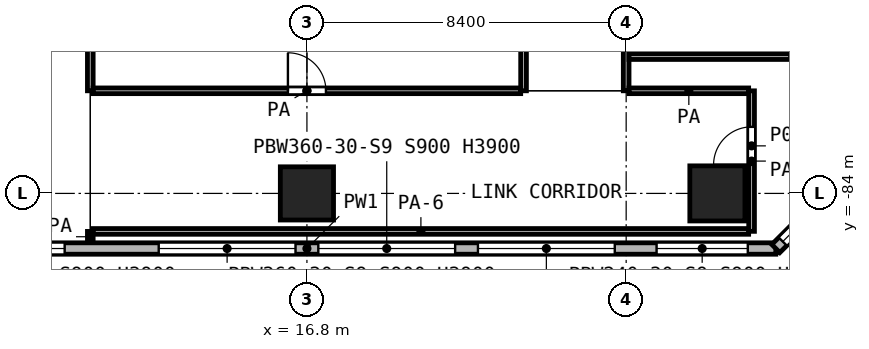
"""IFC4 building model, lengths in metres.
Left out: names, types, materials, properties, quantities, classifications, styles, units other than length and angle.
Written with IfcOpenShell. Run it as: python <this file> out.ifc"""

import sys

from ifc_helpers import new_model, si_unit, direction, frame, frame_2d, origin, origin_2d, place, context, subcontext, project, spatial, rectangle, extrude, element, fill, save


model = new_model("IFC4")
c1 = context("Model", 3, precision=1e-05, world=origin(), true_north=direction((0.0, 1.0)))
c2 = subcontext(c1, "Body", "Model", "MODEL_VIEW")
j1 = project(units=[si_unit("LENGTHUNIT", "METRE"), si_unit("PLANEANGLEUNIT", "RADIAN")], contexts=[c1])
p1 = place(None, origin())
s1 = spatial("IfcSite", under=j1, at=p1, CompositionType="ELEMENT")
p2 = place(p1, origin())
s2 = spatial("IfcBuilding", under=s1, at=p2, CompositionType="ELEMENT")
p3 = place(p2, frame((0.0, 0.0, 12.6)))
s3 = spatial("IfcBuildingStorey", under=s2, at=p3, CompositionType="ELEMENT", Elevation=12.6)
p4 = place(p3, frame((16.8, -84.0, 0.0), z_axis=(0.0, 0.0, 1.0), x_axis=(1.0, 0.0, 0.0)))
e1 = element("IfcColumn", 1, at=p4, inside=s3, PredefinedType="COLUMN", context=c2, shape_type="SweptSolid", body=[
    extrude(rectangle(XDim=1.4, YDim=1.4, at=origin_2d()), origin(), (0.0, 0.0, 1.0), 5.6),
])
p5 = place(p3, frame((27.6, -84.0, 0.0), z_axis=(0.0, 0.0, 1.0), x_axis=(1.0, 0.0, 0.0)))
e2 = element("IfcColumn", 2, at=p5, inside=s3, PredefinedType="COLUMN", context=c2, shape_type="SweptSolid", body=[
    extrude(rectangle(XDim=1.45, YDim=1.45, at=origin_2d()), origin(), (0.0, 0.0, 1.0), 5.6),
])
p6 = place(p3, frame((4.462, -85.45, 0.0), z_axis=(0.0, 0.0, 1.0), x_axis=(1.0, 0.0, 0.0)))
e3 = element("IfcWall", 3, at=p6, inside=s3, PredefinedType="SOLIDWALL", context=c2, shape_type="SweptSolid", body=[
    extrude(rectangle(XDim=24.676, YDim=0.3, at=frame_2d((12.338, 0.0))), origin(), (0.0, 0.0, 1.0), 5.25),
])
p7 = place(p6, frame((0.738, 0.0, 0.9)))
e4 = element("IfcOpeningElement", 4, at=p7, cuts=e3, PredefinedType="OPENING", context=c2, shape_type="SweptSolid", body=[
    extrude(rectangle(XDim=2.4, YDim=3.0, at=frame_2d((1.2, 1.5))), frame((0.0, 0.16, 0.0), z_axis=(0.0, -1.0, 0.0), x_axis=(1.0, 0.0, 0.0)), (0.0, 0.0, 1.0), 0.32),
])
p8 = place(p6, frame((4.763, 0.0, 0.9)))
e5 = element("IfcOpeningElement", 5, at=p8, cuts=e3, PredefinedType="OPENING", context=c2, shape_type="SweptSolid", body=[
    extrude(rectangle(XDim=1.2, YDim=3.0, at=frame_2d((0.6, 1.5))), frame((0.0, 0.16, 0.0), z_axis=(0.0, -1.0, 0.0), x_axis=(1.0, 0.0, 0.0)), (0.0, 0.0, 1.0), 0.32),
])
p9 = place(p6, frame((8.438, 0.0, 0.9)))
e6 = element("IfcOpeningElement", 6, at=p9, cuts=e3, PredefinedType="OPENING", context=c2, shape_type="SweptSolid", body=[
    extrude(rectangle(XDim=3.6, YDim=3.0, at=frame_2d((1.8, 1.5))), frame((0.0, 0.16, 0.0), z_axis=(0.0, -1.0, 0.0), x_axis=(1.0, 0.0, 0.0)), (0.0, 0.0, 1.0), 0.32),
])
p10 = place(p6, frame((12.638, 0.0, 0.9)))
e7 = element("IfcOpeningElement", 7, at=p10, cuts=e3, PredefinedType="OPENING", context=c2, shape_type="SweptSolid", body=[
    extrude(rectangle(XDim=3.6, YDim=3.0, at=frame_2d((1.8, 1.5))), frame((0.0, 0.16, 0.0), z_axis=(0.0, -1.0, 0.0), x_axis=(1.0, 0.0, 0.0)), (0.0, 0.0, 1.0), 0.32),
])
p11 = place(p6, frame((16.838, 0.0, 0.9)))
e8 = element("IfcOpeningElement", 8, at=p11, cuts=e3, PredefinedType="OPENING", context=c2, shape_type="SweptSolid", body=[
    extrude(rectangle(XDim=3.6, YDim=3.0, at=frame_2d((1.8, 1.5))), frame((0.0, 0.16, 0.0), z_axis=(0.0, -1.0, 0.0), x_axis=(1.0, 0.0, 0.0)), (0.0, 0.0, 1.0), 0.32),
])
p12 = place(p6, frame((21.538, 0.0, 0.9)))
e9 = element("IfcOpeningElement", 9, at=p12, cuts=e3, PredefinedType="OPENING", context=c2, shape_type="SweptSolid", body=[
    extrude(rectangle(XDim=2.4, YDim=3.0, at=frame_2d((1.2, 1.5))), frame((0.0, 0.16, 0.0), z_axis=(0.0, -1.0, 0.0), x_axis=(1.0, 0.0, 0.0)), (0.0, 0.0, 1.0), 0.32),
])
p13 = place(p3, frame((29.138, -85.45, 0.0), z_axis=(0.0, 0.0, 1.0), x_axis=(0.707106781187, 0.707106781187, 0.0)))
e10 = element("IfcWall", 10, at=p13, inside=s3, PredefinedType="SOLIDWALL", context=c2, shape_type="SweptSolid", body=[
    extrude(rectangle(XDim=8.361, YDim=0.3, at=frame_2d((4.181, 0.0))), origin(), (0.0, 0.0, 1.0), 5.25),
])
p14 = place(p13, frame((0.259, 0.0, 0.9)))
e11 = element("IfcOpeningElement", 11, at=p14, cuts=e10, PredefinedType="OPENING", context=c2, shape_type="SweptSolid", body=[
    extrude(rectangle(XDim=3.6, YDim=3.0, at=frame_2d((1.8, 1.5))), frame((0.0, 0.16, 0.0), z_axis=(0.0, -1.0, 0.0), x_axis=(1.0, 0.0, 0.0)), (0.0, 0.0, 1.0), 0.32),
])
p15 = place(p13, frame((4.911, 0.0, 0.9)))
e12 = element("IfcOpeningElement", 12, at=p15, cuts=e10, PredefinedType="OPENING", context=c2, shape_type="SweptSolid", body=[
    extrude(rectangle(XDim=1.2, YDim=3.0, at=frame_2d((0.6, 1.5))), frame((0.0, 0.16, 0.0), z_axis=(0.0, -1.0, 0.0), x_axis=(1.0, 0.0, 0.0)), (0.0, 0.0, 1.0), 0.32),
])
p16 = place(p3, frame((11.175, -85.0, 0.0), z_axis=(0.0, 0.0, 1.0), x_axis=(1.0, 0.0, 0.0)))
e13 = element("IfcWall", 13, at=p16, inside=s3, PredefinedType="PARTITIONING", context=c2, shape_type="SweptSolid", body=[
    extrude(rectangle(XDim=17.248, YDim=0.15, at=frame_2d((8.624, 0.0))), origin(), (0.0, 0.0, 1.0), 4.35),
])
p17 = place(p3, frame((11.175, -81.3, 0.0), z_axis=(0.0, 0.0, 1.0), x_axis=(1.0, 0.0, 0.0)))
e14 = element("IfcWall", 14, at=p17, inside=s3, PredefinedType="PARTITIONING", context=c2, shape_type="SweptSolid", body=[
    extrude(rectangle(XDim=11.25, YDim=0.15, at=frame_2d((5.625, 0.0))), origin(), (0.0, 0.0, 1.0), 5.25),
])
p18 = place(p17, frame((5.125, 0.0, 0.0)))
e15 = element("IfcOpeningElement", 15, at=p18, cuts=e14, PredefinedType="OPENING", context=c2, shape_type="SweptSolid", body=[
    extrude(rectangle(XDim=1.0, YDim=2.1, at=frame_2d((0.5, 1.05))), frame((0.0, 0.085, 0.0), z_axis=(0.0, -1.0, 0.0), x_axis=(1.0, 0.0, 0.0)), (0.0, 0.0, 1.0), 0.17),
])
p19 = place(p3, frame((25.275, -81.3, 0.0), z_axis=(0.0, 0.0, 1.0), x_axis=(1.0, 0.0, 0.0)))
e16 = element("IfcWall", 16, at=p19, inside=s3, PredefinedType="PARTITIONING", context=c2, shape_type="SweptSolid", body=[
    extrude(rectangle(XDim=3.148, YDim=0.15, at=frame_2d((1.574, 0.0))), origin(), (0.0, 0.0, 1.0), 5.25),
])
p20 = place(p3, frame((25.275, -80.4, 0.0), z_axis=(0.0, 0.0, 1.0), x_axis=(1.0, 0.0, 0.0)))
e17 = element("IfcWall", 17, at=p20, inside=s3, PredefinedType="PARTITIONING", context=c2, shape_type="SweptSolid", body=[
    extrude(rectangle(XDim=8.612, YDim=0.15, at=frame_2d((4.306, 0.0))), origin(), (0.0, 0.0, 1.0), 3.85),
])
p21 = place(p3, frame((11.1, -85.28, 0.0), z_axis=(0.0, 0.0, 1.0), x_axis=(0.0, 1.0, 0.0)))
e18 = element("IfcWall", 18, at=p21, inside=s3, PredefinedType="PARTITIONING", context=c2, shape_type="SweptSolid", body=[
    extrude(rectangle(XDim=0.28, YDim=0.15, at=frame_2d((0.14, 0.0))), origin(), (0.0, 0.0, 1.0), 5.25),
])
p22 = place(p3, frame((11.1, -81.3, 0.0), z_axis=(0.0, 0.0, 1.0), x_axis=(0.0, 1.0, 0.0)))
e19 = element("IfcWall", 19, at=p22, inside=s3, PredefinedType="PARTITIONING", context=c2, shape_type="SweptSolid", body=[
    extrude(rectangle(XDim=51.9, YDim=0.15, at=frame_2d((25.95, 0.0))), origin(), (0.0, 0.0, 1.0), 5.25),
])
p23 = place(p22, frame((36.45, 0.0, 0.0)))
e20 = element("IfcOpeningElement", 20, at=p23, cuts=e19, PredefinedType="OPENING", context=c2, shape_type="SweptSolid", body=[
    extrude(rectangle(XDim=1.5, YDim=2.1, at=frame_2d((0.75, 1.05))), frame((0.0, 0.085, 0.0), z_axis=(0.0, -1.0, 0.0), x_axis=(1.0, 0.0, 0.0)), (0.0, 0.0, 1.0), 0.17),
])
p24 = place(p22, frame((28.05, 0.0, 0.0)))
e21 = element("IfcOpeningElement", 21, at=p24, cuts=e19, PredefinedType="OPENING", context=c2, shape_type="SweptSolid", body=[
    extrude(rectangle(XDim=1.5, YDim=2.1, at=frame_2d((0.75, 1.05))), frame((0.0, 0.085, 0.0), z_axis=(0.0, -1.0, 0.0), x_axis=(1.0, 0.0, 0.0)), (0.0, 0.0, 1.0), 0.17),
])
p25 = place(p22, frame((25.95, 0.0, 0.0)))
e22 = element("IfcOpeningElement", 22, at=p25, cuts=e19, PredefinedType="OPENING", context=c2, shape_type="SweptSolid", body=[
    extrude(rectangle(XDim=1.5, YDim=2.1, at=frame_2d((0.75, 1.05))), frame((0.0, 0.085, 0.0), z_axis=(0.0, -1.0, 0.0), x_axis=(1.0, 0.0, 0.0)), (0.0, 0.0, 1.0), 0.17),
])
p26 = place(p22, frame((23.85, 0.0, 0.0)))
e23 = element("IfcOpeningElement", 23, at=p26, cuts=e19, PredefinedType="OPENING", context=c2, shape_type="SweptSolid", body=[
    extrude(rectangle(XDim=1.5, YDim=2.1, at=frame_2d((0.75, 1.05))), frame((0.0, 0.085, 0.0), z_axis=(0.0, -1.0, 0.0), x_axis=(1.0, 0.0, 0.0)), (0.0, 0.0, 1.0), 0.17),
])
p27 = place(p22, frame((19.8, 0.0, 0.0)))
e24 = element("IfcOpeningElement", 24, at=p27, cuts=e19, PredefinedType="OPENING", context=c2, shape_type="SweptSolid", body=[
    extrude(rectangle(XDim=1.5, YDim=2.1, at=frame_2d((0.75, 1.05))), frame((0.0, 0.085, 0.0), z_axis=(0.0, -1.0, 0.0), x_axis=(1.0, 0.0, 0.0)), (0.0, 0.0, 1.0), 0.17),
])
p28 = place(p22, frame((16.5, 0.0, 0.0)))
e25 = element("IfcOpeningElement", 25, at=p28, cuts=e19, PredefinedType="OPENING", context=c2, shape_type="SweptSolid", body=[
    extrude(rectangle(XDim=1.2, YDim=2.1, at=frame_2d((0.6, 1.05))), frame((0.0, 0.085, 0.0), z_axis=(0.0, -1.0, 0.0), x_axis=(1.0, 0.0, 0.0)), (0.0, 0.0, 1.0), 0.17),
])
p29 = place(p22, frame((15.0, 0.0, 0.0)))
e26 = element("IfcOpeningElement", 26, at=p29, cuts=e19, PredefinedType="OPENING", context=c2, shape_type="SweptSolid", body=[
    extrude(rectangle(XDim=1.2, YDim=2.1, at=frame_2d((0.6, 1.05))), frame((0.0, 0.085, 0.0), z_axis=(0.0, -1.0, 0.0), x_axis=(1.0, 0.0, 0.0)), (0.0, 0.0, 1.0), 0.17),
])
p30 = place(p22, frame((11.25, 0.0, 0.0)))
e27 = element("IfcOpeningElement", 27, at=p30, cuts=e19, PredefinedType="OPENING", context=c2, shape_type="SweptSolid", body=[
    extrude(rectangle(XDim=1.5, YDim=2.1, at=frame_2d((0.75, 1.05))), frame((0.0, 0.085, 0.0), z_axis=(0.0, -1.0, 0.0), x_axis=(1.0, 0.0, 0.0)), (0.0, 0.0, 1.0), 0.17),
])
p31 = place(p22, frame((9.15, 0.0, 0.0)))
e28 = element("IfcOpeningElement", 28, at=p31, cuts=e19, PredefinedType="OPENING", context=c2, shape_type="SweptSolid", body=[
    extrude(rectangle(XDim=1.5, YDim=2.1, at=frame_2d((0.75, 1.05))), frame((0.0, 0.085, 0.0), z_axis=(0.0, -1.0, 0.0), x_axis=(1.0, 0.0, 0.0)), (0.0, 0.0, 1.0), 0.17),
])
p32 = place(p22, frame((7.05, 0.0, 0.0)))
e29 = element("IfcOpeningElement", 29, at=p32, cuts=e19, PredefinedType="OPENING", context=c2, shape_type="SweptSolid", body=[
    extrude(rectangle(XDim=1.5, YDim=2.1, at=frame_2d((0.75, 1.05))), frame((0.0, 0.085, 0.0), z_axis=(0.0, -1.0, 0.0), x_axis=(1.0, 0.0, 0.0)), (0.0, 0.0, 1.0), 0.17),
])
p33 = place(p3, frame((22.5, -81.3, 0.0), z_axis=(0.0, 0.0, 1.0), x_axis=(0.0, 1.0, 0.0)))
e30 = element("IfcWall", 30, at=p33, inside=s3, PredefinedType="PARTITIONING", context=c2, shape_type="SweptSolid", body=[
    extrude(rectangle(XDim=56.1, YDim=0.15, at=frame_2d((28.05, 0.0))), origin(), (0.0, 0.0, 1.0), 5.25),
])
p34 = place(p33, frame((49.05, 0.0, 0.0)))
e31 = element("IfcOpeningElement", 31, at=p34, cuts=e30, PredefinedType="OPENING", context=c2, shape_type="SweptSolid", body=[
    extrude(rectangle(XDim=1.5, YDim=2.1, at=frame_2d((0.75, 1.05))), frame((0.0, 0.085, 0.0), z_axis=(0.0, -1.0, 0.0), x_axis=(1.0, 0.0, 0.0)), (0.0, 0.0, 1.0), 0.17),
])
p35 = place(p33, frame((51.15, 0.0, 0.0)))
e32 = element("IfcOpeningElement", 32, at=p35, cuts=e30, PredefinedType="OPENING", context=c2, shape_type="SweptSolid", body=[
    extrude(rectangle(XDim=1.5, YDim=2.1, at=frame_2d((0.75, 1.05))), frame((0.0, 0.085, 0.0), z_axis=(0.0, -1.0, 0.0), x_axis=(1.0, 0.0, 0.0)), (0.0, 0.0, 1.0), 0.17),
])
p36 = place(p33, frame((53.25, 0.0, 0.0)))
e33 = element("IfcOpeningElement", 33, at=p36, cuts=e30, PredefinedType="OPENING", context=c2, shape_type="SweptSolid", body=[
    extrude(rectangle(XDim=1.5, YDim=2.1, at=frame_2d((0.75, 1.05))), frame((0.0, 0.085, 0.0), z_axis=(0.0, -1.0, 0.0), x_axis=(1.0, 0.0, 0.0)), (0.0, 0.0, 1.0), 0.17),
])
p37 = place(p33, frame((40.65, 0.0, 0.0)))
e34 = element("IfcOpeningElement", 34, at=p37, cuts=e30, PredefinedType="OPENING", context=c2, shape_type="SweptSolid", body=[
    extrude(rectangle(XDim=1.5, YDim=2.1, at=frame_2d((0.75, 1.05))), frame((0.0, 0.085, 0.0), z_axis=(0.0, -1.0, 0.0), x_axis=(1.0, 0.0, 0.0)), (0.0, 0.0, 1.0), 0.17),
])
p38 = place(p33, frame((42.75, 0.0, 0.0)))
e35 = element("IfcOpeningElement", 35, at=p38, cuts=e30, PredefinedType="OPENING", context=c2, shape_type="SweptSolid", body=[
    extrude(rectangle(XDim=1.5, YDim=2.1, at=frame_2d((0.75, 1.05))), frame((0.0, 0.085, 0.0), z_axis=(0.0, -1.0, 0.0), x_axis=(1.0, 0.0, 0.0)), (0.0, 0.0, 1.0), 0.17),
])
p39 = place(p33, frame((44.85, 0.0, 0.0)))
e36 = element("IfcOpeningElement", 36, at=p39, cuts=e30, PredefinedType="OPENING", context=c2, shape_type="SweptSolid", body=[
    extrude(rectangle(XDim=1.5, YDim=2.1, at=frame_2d((0.75, 1.05))), frame((0.0, 0.085, 0.0), z_axis=(0.0, -1.0, 0.0), x_axis=(1.0, 0.0, 0.0)), (0.0, 0.0, 1.0), 0.17),
])
p40 = place(p33, frame((36.45, 0.0, 0.0)))
e37 = element("IfcOpeningElement", 37, at=p40, cuts=e30, PredefinedType="OPENING", context=c2, shape_type="SweptSolid", body=[
    extrude(rectangle(XDim=1.5, YDim=2.1, at=frame_2d((0.75, 1.05))), frame((0.0, 0.085, 0.0), z_axis=(0.0, -1.0, 0.0), x_axis=(1.0, 0.0, 0.0)), (0.0, 0.0, 1.0), 0.17),
])
p41 = place(p33, frame((31.7, 0.0, 0.0)))
e38 = element("IfcOpeningElement", 38, at=p41, cuts=e30, PredefinedType="OPENING", context=c2, shape_type="SweptSolid", body=[
    extrude(rectangle(XDim=1.2, YDim=2.1, at=frame_2d((0.6, 1.05))), frame((0.0, 0.085, 0.0), z_axis=(0.0, -1.0, 0.0), x_axis=(1.0, 0.0, 0.0)), (0.0, 0.0, 1.0), 0.17),
])
p42 = place(p33, frame((33.2, 0.0, 0.0)))
e39 = element("IfcOpeningElement", 39, at=p42, cuts=e30, PredefinedType="OPENING", context=c2, shape_type="SweptSolid", body=[
    extrude(rectangle(XDim=1.2, YDim=2.1, at=frame_2d((0.6, 1.05))), frame((0.0, 0.085, 0.0), z_axis=(0.0, -1.0, 0.0), x_axis=(1.0, 0.0, 0.0)), (0.0, 0.0, 1.0), 0.17),
])
p43 = place(p33, frame((19.8, 0.0, 0.0)))
e40 = element("IfcOpeningElement", 40, at=p43, cuts=e30, PredefinedType="OPENING", context=c2, shape_type="SweptSolid", body=[
    extrude(rectangle(XDim=1.5, YDim=2.1, at=frame_2d((0.75, 1.05))), frame((0.0, 0.085, 0.0), z_axis=(0.0, -1.0, 0.0), x_axis=(1.0, 0.0, 0.0)), (0.0, 0.0, 1.0), 0.17),
])
p44 = place(p3, frame((25.2, -81.3, 0.0), z_axis=(0.0, 0.0, 1.0), x_axis=(0.0, 1.0, 0.0)))
e41 = element("IfcWall", 41, at=p44, inside=s3, PredefinedType="PARTITIONING", context=c2, shape_type="SweptSolid", body=[
    extrude(rectangle(XDim=56.1, YDim=0.15, at=frame_2d((28.05, 0.0))), origin(), (0.0, 0.0, 1.0), 5.25),
])
p45 = place(p44, frame((48.5, 0.0, 0.0)))
e42 = element("IfcOpeningElement", 42, at=p45, cuts=e41, PredefinedType="OPENING", context=c2, shape_type="SweptSolid", body=[
    extrude(rectangle(XDim=1.2, YDim=2.1, at=frame_2d((0.6, 1.05))), frame((0.0, 0.085, 0.0), z_axis=(0.0, -1.0, 0.0), x_axis=(1.0, 0.0, 0.0)), (0.0, 0.0, 1.0), 0.17),
])
p46 = place(p44, frame((40.1, 0.0, 0.0)))
e43 = element("IfcOpeningElement", 43, at=p46, cuts=e41, PredefinedType="OPENING", context=c2, shape_type="SweptSolid", body=[
    extrude(rectangle(XDim=1.2, YDim=2.1, at=frame_2d((0.6, 1.05))), frame((0.0, 0.085, 0.0), z_axis=(0.0, -1.0, 0.0), x_axis=(1.0, 0.0, 0.0)), (0.0, 0.0, 1.0), 0.17),
])
p47 = place(p44, frame((36.75, 0.0, 0.0)))
e44 = element("IfcOpeningElement", 44, at=p47, cuts=e41, PredefinedType="OPENING", context=c2, shape_type="SweptSolid", body=[
    extrude(rectangle(XDim=1.2, YDim=2.1, at=frame_2d((0.6, 1.05))), frame((0.0, 0.085, 0.0), z_axis=(0.0, -1.0, 0.0), x_axis=(1.0, 0.0, 0.0)), (0.0, 0.0, 1.0), 0.17),
])
p48 = place(p44, frame((32.55, 0.0, 0.0)))
e45 = element("IfcOpeningElement", 45, at=p48, cuts=e41, PredefinedType="OPENING", context=c2, shape_type="SweptSolid", body=[
    extrude(rectangle(XDim=1.2, YDim=2.1, at=frame_2d((0.6, 1.05))), frame((0.0, 0.085, 0.0), z_axis=(0.0, -1.0, 0.0), x_axis=(1.0, 0.0, 0.0)), (0.0, 0.0, 1.0), 0.17),
])
p49 = place(p44, frame((28.05, 0.0, 0.0)))
e46 = element("IfcOpeningElement", 46, at=p49, cuts=e41, PredefinedType="OPENING", context=c2, shape_type="SweptSolid", body=[
    extrude(rectangle(XDim=1.2, YDim=2.1, at=frame_2d((0.6, 1.05))), frame((0.0, 0.085, 0.0), z_axis=(0.0, -1.0, 0.0), x_axis=(1.0, 0.0, 0.0)), (0.0, 0.0, 1.0), 0.17),
])
p50 = place(p44, frame((23.85, 0.0, 0.0)))
e47 = element("IfcOpeningElement", 47, at=p50, cuts=e41, PredefinedType="OPENING", context=c2, shape_type="SweptSolid", body=[
    extrude(rectangle(XDim=1.2, YDim=2.1, at=frame_2d((0.6, 1.05))), frame((0.0, 0.085, 0.0), z_axis=(0.0, -1.0, 0.0), x_axis=(1.0, 0.0, 0.0)), (0.0, 0.0, 1.0), 0.17),
])
p51 = place(p44, frame((20.1, 0.0, 0.0)))
e48 = element("IfcOpeningElement", 48, at=p51, cuts=e41, PredefinedType="OPENING", context=c2, shape_type="SweptSolid", body=[
    extrude(rectangle(XDim=1.2, YDim=2.1, at=frame_2d((0.6, 1.05))), frame((0.0, 0.085, 0.0), z_axis=(0.0, -1.0, 0.0), x_axis=(1.0, 0.0, 0.0)), (0.0, 0.0, 1.0), 0.17),
])
p52 = place(p44, frame((15.9, 0.0, 0.0)))
e49 = element("IfcOpeningElement", 49, at=p52, cuts=e41, PredefinedType="OPENING", context=c2, shape_type="SweptSolid", body=[
    extrude(rectangle(XDim=1.2, YDim=2.1, at=frame_2d((0.6, 1.05))), frame((0.0, 0.085, 0.0), z_axis=(0.0, -1.0, 0.0), x_axis=(1.0, 0.0, 0.0)), (0.0, 0.0, 1.0), 0.17),
])
p53 = place(p44, frame((11.4, 0.0, 0.0)))
e50 = element("IfcOpeningElement", 50, at=p53, cuts=e41, PredefinedType="OPENING", context=c2, shape_type="SweptSolid", body=[
    extrude(rectangle(XDim=1.2, YDim=2.1, at=frame_2d((0.6, 1.05))), frame((0.0, 0.085, 0.0), z_axis=(0.0, -1.0, 0.0), x_axis=(1.0, 0.0, 0.0)), (0.0, 0.0, 1.0), 0.17),
])
p54 = place(p44, frame((7.2, 0.0, 0.0)))
e51 = element("IfcOpeningElement", 51, at=p54, cuts=e41, PredefinedType="OPENING", context=c2, shape_type="SweptSolid", body=[
    extrude(rectangle(XDim=1.2, YDim=2.1, at=frame_2d((0.6, 1.05))), frame((0.0, 0.085, 0.0), z_axis=(0.0, -1.0, 0.0), x_axis=(1.0, 0.0, 0.0)), (0.0, 0.0, 1.0), 0.17),
])
p55 = place(p44, frame((2.7, 0.0, 0.0)))
e52 = element("IfcOpeningElement", 52, at=p55, cuts=e41, PredefinedType="OPENING", context=c2, shape_type="SweptSolid", body=[
    extrude(rectangle(XDim=1.2, YDim=2.1, at=frame_2d((0.6, 1.05))), frame((0.0, 0.085, 0.0), z_axis=(0.0, -1.0, 0.0), x_axis=(1.0, 0.0, 0.0)), (0.0, 0.0, 1.0), 0.17),
])
p56 = place(p3, frame((28.5, -84.998, 0.0), z_axis=(0.0, 0.0, 1.0), x_axis=(0.0, 1.0, 0.0)))
e53 = element("IfcWall", 53, at=p56, inside=s3, PredefinedType="PARTITIONING", context=c2, shape_type="SweptSolid", body=[
    extrude(rectangle(XDim=3.697, YDim=0.15, at=frame_2d((1.849, 0.0))), origin(), (0.0, 0.0, 1.0), 3.85),
])
p57 = place(p56, frame((1.749, 0.0, 0.0)))
e54 = element("IfcOpeningElement", 54, at=p57, cuts=e53, PredefinedType="OPENING", context=c2, shape_type="SweptSolid", body=[
    extrude(rectangle(XDim=1.0, YDim=2.1, at=frame_2d((0.5, 1.05))), frame((0.0, 0.085, 0.0), z_axis=(0.0, -1.0, 0.0), x_axis=(1.0, 0.0, 0.0)), (0.0, 0.0, 1.0), 0.17),
])
p58 = place(p8, origin())
e55 = element("IfcWindow", 55, at=p58, inside=s3, PartitioningType="SINGLE_PANEL", PredefinedType="WINDOW", context=c2, shape_type="SweptSolid", body=[
    extrude(rectangle(XDim=1.2, YDim=3.0, at=frame_2d((0.6, 1.5))), frame((0.0, 0.03, 0.0), z_axis=(0.0, -1.0, 0.0), x_axis=(1.0, 0.0, 0.0)), (0.0, 0.0, 1.0), 0.06),
])
fill(e5, e55)
p59 = place(p9, origin())
e56 = element("IfcWindow", 56, at=p59, inside=s3, PartitioningType="SINGLE_PANEL", PredefinedType="WINDOW", context=c2, shape_type="SweptSolid", body=[
    extrude(rectangle(XDim=3.6, YDim=3.0, at=frame_2d((1.8, 1.5))), frame((0.0, 0.03, 0.0), z_axis=(0.0, -1.0, 0.0), x_axis=(1.0, 0.0, 0.0)), (0.0, 0.0, 1.0), 0.06),
])
fill(e6, e56)
p60 = place(p10, origin())
e57 = element("IfcWindow", 57, at=p60, inside=s3, PartitioningType="SINGLE_PANEL", PredefinedType="WINDOW", context=c2, shape_type="SweptSolid", body=[
    extrude(rectangle(XDim=3.6, YDim=3.0, at=frame_2d((1.8, 1.5))), frame((0.0, 0.03, 0.0), z_axis=(0.0, -1.0, 0.0), x_axis=(1.0, 0.0, 0.0)), (0.0, 0.0, 1.0), 0.06),
])
fill(e7, e57)
p61 = place(p11, origin())
e58 = element("IfcWindow", 58, at=p61, inside=s3, PartitioningType="SINGLE_PANEL", PredefinedType="WINDOW", context=c2, shape_type="SweptSolid", body=[
    extrude(rectangle(XDim=3.6, YDim=3.0, at=frame_2d((1.8, 1.5))), frame((0.0, 0.03, 0.0), z_axis=(0.0, -1.0, 0.0), x_axis=(1.0, 0.0, 0.0)), (0.0, 0.0, 1.0), 0.06),
])
fill(e8, e58)
p62 = place(p12, origin())
e59 = element("IfcWindow", 59, at=p62, inside=s3, PartitioningType="SINGLE_PANEL", PredefinedType="WINDOW", context=c2, shape_type="SweptSolid", body=[
    extrude(rectangle(XDim=2.4, YDim=3.0, at=frame_2d((1.2, 1.5))), frame((0.0, 0.03, 0.0), z_axis=(0.0, -1.0, 0.0), x_axis=(1.0, 0.0, 0.0)), (0.0, 0.0, 1.0), 0.06),
])
fill(e9, e59)
p63 = place(p14, origin())
e60 = element("IfcWindow", 60, at=p63, inside=s3, PartitioningType="SINGLE_PANEL", PredefinedType="WINDOW", context=c2, shape_type="SweptSolid", body=[
    extrude(rectangle(XDim=3.6, YDim=3.0, at=frame_2d((1.8, 1.5))), frame((0.0, 0.03, 0.0), z_axis=(0.0, -1.0, 0.0), x_axis=(1.0, 0.0, 0.0)), (0.0, 0.0, 1.0), 0.06),
])
fill(e11, e60)
p64 = place(p18, origin())
e61 = element("IfcDoor", 61, at=p64, inside=s3, OperationType="SINGLE_SWING_LEFT", PredefinedType="DOOR", context=c2, shape_type="SweptSolid", body=[
    extrude(rectangle(XDim=1.0, YDim=2.1, at=frame_2d((0.5, 1.05))), frame((0.0, 0.025, 0.0), z_axis=(0.0, -1.0, 0.0), x_axis=(1.0, 0.0, 0.0)), (0.0, 0.0, 1.0), 0.05),
])
fill(e15, e61)
p65 = place(p57, origin())
e62 = element("IfcDoor", 62, at=p65, inside=s3, OperationType="SINGLE_SWING_LEFT", PredefinedType="DOOR", context=c2, shape_type="SweptSolid", body=[
    extrude(rectangle(XDim=1.0, YDim=2.1, at=frame_2d((0.5, 1.05))), frame((0.0, 0.025, 0.0), z_axis=(0.0, -1.0, 0.0), x_axis=(1.0, 0.0, 0.0)), (0.0, 0.0, 1.0), 0.05),
])
fill(e54, e62)
save(model, sys.argv[1])
